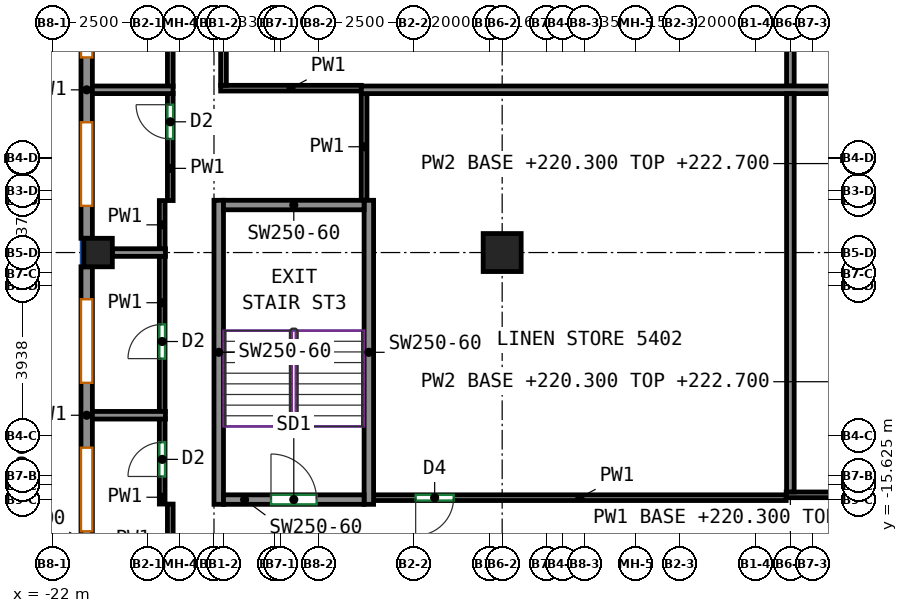
"""IFC4 building model, lengths in metres.
Left out: names, types, materials, properties, quantities, classifications, styles, units other than length and angle.
Written with IfcOpenShell. Run it as: python <this file> out.ifc"""

import sys

from ifc_helpers import new_model, si_unit, direction, frame, frame_2d, origin, origin_2d, place, context, subcontext, project, spatial, rectangle, extrude, source, transform, mapped, element, fill, save


model = new_model("IFC4")
c1 = context("Model", 3, precision=1e-05, world=origin(), true_north=direction((0.0, 1.0)))
c2 = subcontext(c1, "Body", "Model", "MODEL_VIEW")
j1 = project(units=[si_unit("LENGTHUNIT", "METRE"), si_unit("PLANEANGLEUNIT", "RADIAN")], contexts=[c1])
p1 = place(None, origin())
s1 = spatial("IfcSite", under=j1, at=p1, CompositionType="ELEMENT")
p2 = place(p1, origin())
s2 = spatial("IfcBuilding", under=s1, at=p2, CompositionType="ELEMENT")
p3 = place(p2, frame((0.0, 0.0, 220.3)))
s3 = spatial("IfcBuildingStorey", under=s2, at=p3, CompositionType="ELEMENT", Elevation=220.3)
m1 = source(origin(), c2, "Body", "SweptSolid", [
    extrude(rectangle(XDim=0.75, YDim=0.75, at=origin_2d()), origin(), (0.0, 0.0, 1.0), 3.0),
])
p4 = place(p3, frame((-20.8, -9.125, 0.0), z_axis=(0.0, 0.0, 1.0), x_axis=(1.0, 0.0, 0.0)))
e1 = element("IfcColumn", 1, at=p4, inside=s3, PredefinedType="COLUMN", context=c2, shape_type="MappedRepresentation", body=[
    mapped(m1, transform((0.0, 0.0, 0.0))),
])
m2 = source(origin(), c2, "Body", "SweptSolid", [
    extrude(rectangle(XDim=1.0, YDim=1.0, at=origin_2d()), origin(), (0.0, 0.0, 1.0), 3.0),
])
p5 = place(p3, frame((-10.167, -9.125, 0.0), z_axis=(0.0, 0.0, 1.0), x_axis=(1.0, 0.0, 0.0)))
e2 = element("IfcColumn", 2, at=p5, inside=s3, PredefinedType="COLUMN", context=c2, shape_type="MappedRepresentation", body=[
    mapped(m2, transform((0.0, 0.0, 0.0))),
])
m3 = source(origin(), c2, "Body", "SweptSolid", [
    extrude(rectangle(XDim=8.0, YDim=0.25, at=frame_2d((4.0, 0.0))), origin(), (0.0, 0.0, 1.0), 3.0),
])
for number, where, z_axis, x_axis in (
    (3, (-17.625, -15.75, 0.0), (0.0, 0.0, 1.0), (0.0, 1.0, 0.0)),
    (4, (-13.675, -15.75, 0.0), (0.0, 0.0, 1.0), (0.0, 1.0, 0.0)),
):
    element("IfcWall", number, at=place(p3, frame(where, z_axis=z_axis, x_axis=x_axis)), inside=s3, PredefinedType="SHEAR", context=c2, shape_type="MappedRepresentation", body=[
        mapped(m3, transform((0.0, 0.0, 0.0))),
    ])
m4 = source(origin(), c2, "Body", "SweptSolid", [
    extrude(rectangle(XDim=3.7, YDim=0.25, at=frame_2d((1.85, 0.0))), origin(), (0.0, 0.0, 1.0), 3.0),
])
p6 = place(p3, frame((-17.5, -15.625, 0.0), z_axis=(0.0, 0.0, 1.0), x_axis=(1.0, 0.0, 0.0)))
e5 = element("IfcWall", 5, at=p6, inside=s3, PredefinedType="SHEAR", context=c2, shape_type="MappedRepresentation", body=[
    mapped(m4, transform((0.0, 0.0, 0.0))),
])
p7 = place(p6, frame((1.25, 0.0, 0.0)))
e6 = element("IfcOpeningElement", 6, at=p7, cuts=e5, PredefinedType="OPENING", context=c2, shape_type="SweptSolid", body=[
    extrude(rectangle(XDim=1.2, YDim=2.1, at=frame_2d((0.6, 1.05))), frame((0.0, 0.135, 0.0), z_axis=(0.0, -1.0, 0.0), x_axis=(1.0, 0.0, 0.0)), (0.0, 0.0, 1.0), 0.27),
])
p8 = place(p3, frame((-17.5, -7.875, 0.0), z_axis=(0.0, 0.0, 1.0), x_axis=(1.0, 0.0, 0.0)))
e7 = element("IfcWall", 7, at=p8, inside=s3, PredefinedType="SHEAR", context=c2, shape_type="MappedRepresentation", body=[
    mapped(m4, transform((0.0, 0.0, 0.0))),
])
m5 = source(origin(), c2, "Body", "SweptSolid", [
    extrude(rectangle(XDim=7.812, YDim=0.3, at=frame_2d((3.906, 0.0))), origin(), (0.0, 0.0, 1.0), 3.0),
])
p9 = place(p3, frame((-21.1, -0.938, 0.0), z_axis=(0.0, 0.0, 1.0), x_axis=(0.0, -1.0, 0.0)))
e8 = element("IfcWall", 8, at=p9, inside=s3, PredefinedType="SOLIDWALL", context=c2, shape_type="MappedRepresentation", body=[
    mapped(m5, transform((0.0, 0.0, 0.0))),
])
p10 = place(p9, frame((0.853, 0.0, 0.85)))
e9 = element("IfcOpeningElement", 9, at=p10, cuts=e8, PredefinedType="OPENING", context=c2, shape_type="SweptSolid", body=[
    extrude(rectangle(XDim=2.2, YDim=1.95, at=frame_2d((1.1, 0.975))), frame((0.0, 0.16, 0.0), z_axis=(0.0, -1.0, 0.0), x_axis=(1.0, 0.0, 0.0)), (0.0, 0.0, 1.0), 0.32),
])
p11 = place(p9, frame((4.76, 0.0, 0.85)))
e10 = element("IfcOpeningElement", 10, at=p11, cuts=e8, PredefinedType="OPENING", context=c2, shape_type="SweptSolid", body=[
    extrude(rectangle(XDim=2.2, YDim=1.95, at=frame_2d((1.1, 0.975))), frame((0.0, 0.16, 0.0), z_axis=(0.0, -1.0, 0.0), x_axis=(1.0, 0.0, 0.0)), (0.0, 0.0, 1.0), 0.32),
])
p12 = place(p3, frame((-21.1, -9.5, 0.0), z_axis=(0.0, 0.0, 1.0), x_axis=(0.0, -1.0, 0.0)))
e11 = element("IfcWall", 11, at=p12, inside=s3, PredefinedType="SOLIDWALL", context=c2, shape_type="MappedRepresentation", body=[
    mapped(m5, transform((0.0, 0.0, 0.0))),
])
p13 = place(p12, frame((0.853, 0.0, 0.85)))
e12 = element("IfcOpeningElement", 12, at=p13, cuts=e11, PredefinedType="OPENING", context=c2, shape_type="SweptSolid", body=[
    extrude(rectangle(XDim=2.2, YDim=1.95, at=frame_2d((1.1, 0.975))), frame((0.0, 0.16, 0.0), z_axis=(0.0, -1.0, 0.0), x_axis=(1.0, 0.0, 0.0)), (0.0, 0.0, 1.0), 0.32),
])
p14 = place(p12, frame((4.759, 0.0, 0.85)))
e13 = element("IfcOpeningElement", 13, at=p14, cuts=e11, PredefinedType="OPENING", context=c2, shape_type="SweptSolid", body=[
    extrude(rectangle(XDim=2.2, YDim=1.95, at=frame_2d((1.1, 0.975))), frame((0.0, 0.16, 0.0), z_axis=(0.0, -1.0, 0.0), x_axis=(1.0, 0.0, 0.0)), (0.0, 0.0, 1.0), 0.32),
])
p15 = place(p3, frame((-18.9, -17.598, 0.0), z_axis=(0.0, 0.0, 1.0), x_axis=(0.0, 1.0, 0.0)))
e14 = element("IfcWall", 14, at=p15, inside=s3, PredefinedType="PARTITIONING", context=c2, shape_type="SweptSolid", body=[
    extrude(rectangle(XDim=1.855, YDim=0.15, at=frame_2d((0.927, 0.0))), origin(), (0.0, 0.0, 1.0), 3.0),
])
p16 = place(p3, frame((-19.113, -15.743, 0.0), z_axis=(0.0, 0.0, 1.0), x_axis=(0.0, 1.0, 0.0)))
e15 = element("IfcWall", 15, at=p16, inside=s3, PredefinedType="PARTITIONING", context=c2, shape_type="SweptSolid", body=[
    extrude(rectangle(XDim=2.247, YDim=0.15, at=frame_2d((1.124, 0.0))), origin(), (0.0, 0.0, 1.0), 3.0),
])
p17 = place(p16, frame((0.726, 0.0, 0.0)))
e16 = element("IfcOpeningElement", 16, at=p17, cuts=e15, PredefinedType="OPENING", context=c2, shape_type="SweptSolid", body=[
    extrude(rectangle(XDim=0.9, YDim=2.1, at=frame_2d((0.45, 1.05))), frame((0.0, 0.085, 0.0), z_axis=(0.0, -1.0, 0.0), x_axis=(1.0, 0.0, 0.0)), (0.0, 0.0, 1.0), 0.17),
])
p18 = place(p3, frame((-19.113, -13.316, 0.0), z_axis=(0.0, 0.0, 1.0), x_axis=(0.0, 1.0, 0.0)))
e17 = element("IfcWall", 17, at=p18, inside=s3, PredefinedType="PARTITIONING", context=c2, shape_type="SweptSolid", body=[
    extrude(rectangle(XDim=4.101, YDim=0.15, at=frame_2d((2.05, 0.0))), origin(), (0.0, 0.0, 1.0), 3.0),
])
p19 = place(p18, frame((1.4, 0.0, 0.0)))
e18 = element("IfcOpeningElement", 18, at=p19, cuts=e17, PredefinedType="OPENING", context=c2, shape_type="SweptSolid", body=[
    extrude(rectangle(XDim=0.9, YDim=2.1, at=frame_2d((0.45, 1.05))), frame((0.0, 0.085, 0.0), z_axis=(0.0, -1.0, 0.0), x_axis=(1.0, 0.0, 0.0)), (0.0, 0.0, 1.0), 0.17),
])
p20 = place(p3, frame((-18.9, -7.757, 0.0), z_axis=(0.0, 0.0, 1.0), x_axis=(0.0, 1.0, 0.0)))
e19 = element("IfcWall", 19, at=p20, inside=s3, PredefinedType="PARTITIONING", context=c2, shape_type="SweptSolid", body=[
    extrude(rectangle(XDim=2.824, YDim=0.15, at=frame_2d((1.412, 0.0))), origin(), (0.0, 0.0, 1.0), 3.0),
])
p21 = place(p20, frame((1.622, 0.0, 0.0)))
e20 = element("IfcOpeningElement", 20, at=p21, cuts=e19, PredefinedType="OPENING", context=c2, shape_type="SweptSolid", body=[
    extrude(rectangle(XDim=0.9, YDim=2.1, at=frame_2d((0.45, 1.05))), frame((0.0, 0.085, 0.0), z_axis=(0.0, -1.0, 0.0), x_axis=(1.0, 0.0, 0.0)), (0.0, 0.0, 1.0), 0.17),
])
p22 = place(p3, frame((-19.113, -9.035, 0.0), z_axis=(0.0, 0.0, 1.0), x_axis=(0.0, 1.0, 0.0)))
e21 = element("IfcWall", 21, at=p22, inside=s3, PredefinedType="PARTITIONING", context=c2, shape_type="SweptSolid", body=[
    extrude(rectangle(XDim=1.278, YDim=0.15, at=frame_2d((0.639, 0.0))), origin(), (0.0, 0.0, 1.0), 3.0),
])
p23 = place(p3, frame((-18.9, -4.753, 0.0), z_axis=(0.0, 0.0, 1.0), x_axis=(0.0, 1.0, 0.0)))
e22 = element("IfcWall", 22, at=p23, inside=s3, PredefinedType="PARTITIONING", context=c2, shape_type="SweptSolid", body=[
    extrude(rectangle(XDim=4.101, YDim=0.15, at=frame_2d((2.05, 0.0))), origin(), (0.0, 0.0, 1.0), 3.0),
])
p24 = place(p23, frame((2.701, 0.0, 0.0)))
e23 = element("IfcOpeningElement", 23, at=p24, cuts=e22, PredefinedType="OPENING", context=c2, shape_type="SweptSolid", body=[
    extrude(rectangle(XDim=0.9, YDim=2.1, at=frame_2d((0.45, 1.05))), frame((0.0, 0.085, 0.0), z_axis=(0.0, -1.0, 0.0), x_axis=(1.0, 0.0, 0.0)), (0.0, 0.0, 1.0), 0.17),
])
p25 = place(p3, frame((-17.575, -4.8, 0.0), z_axis=(0.0, 0.0, 1.0), x_axis=(1.0, 0.0, 0.0)))
e24 = element("IfcWall", 24, at=p25, inside=s3, PredefinedType="PARTITIONING", context=c2, shape_type="SweptSolid", body=[
    extrude(rectangle(XDim=3.702, YDim=0.15, at=frame_2d((1.851, 0.0))), origin(), (0.0, 0.0, 1.0), 3.0),
])
p26 = place(p3, frame((-17.5, -4.725, 0.0), z_axis=(0.0, 0.0, 1.0), x_axis=(0.0, 1.0, 0.0)))
e25 = element("IfcWall", 25, at=p26, inside=s3, PredefinedType="PARTITIONING", context=c2, shape_type="SweptSolid", body=[
    extrude(rectangle(XDim=8.35, YDim=0.15, at=frame_2d((4.175, 0.0))), origin(), (0.0, 0.0, 1.0), 3.0),
])
p27 = place(p3, frame((-13.8, -7.75, 0.0), z_axis=(0.0, 0.0, 1.0), x_axis=(0.0, 1.0, 0.0)))
e26 = element("IfcWall", 26, at=p27, inside=s3, PredefinedType="PARTITIONING", context=c2, shape_type="SweptSolid", body=[
    extrude(rectangle(XDim=2.817, YDim=0.15, at=frame_2d((1.408, 0.0))), origin(), (0.0, 0.0, 1.0), 3.0),
])
p28 = place(p3, frame((-2.693, -15.575, 0.0), z_axis=(0.0, 0.0, 1.0), x_axis=(-1.0, 0.0, 0.0)))
e27 = element("IfcWall", 27, at=p28, inside=s3, PredefinedType="PARTITIONING", context=c2, shape_type="SweptSolid", body=[
    extrude(rectangle(XDim=10.857, YDim=0.15, at=frame_2d((5.428, 0.0))), origin(), (0.0, 0.0, 1.0), 3.0),
])
p29 = place(p28, frame((8.75, 0.0, 0.0)))
e28 = element("IfcOpeningElement", 28, at=p29, cuts=e27, PredefinedType="OPENING", context=c2, shape_type="SweptSolid", body=[
    extrude(rectangle(XDim=1.0, YDim=2.1, at=frame_2d((0.5, 1.05))), frame((0.0, 0.085, 0.0), z_axis=(0.0, -1.0, 0.0), x_axis=(1.0, 0.0, 0.0)), (0.0, 0.0, 1.0), 0.17),
])
p30 = place(p3, frame((-2.693, -15.5, 0.0), z_axis=(0.0, 0.0, 1.0), x_axis=(1.0, 0.0, 0.0)))
e29 = element("IfcWall", 29, at=p30, inside=s3, PredefinedType="PARTITIONING", context=c2, shape_type="SweptSolid", body=[
    extrude(rectangle(XDim=18.968, YDim=0.15, at=frame_2d((9.484, 0.0))), origin(), (0.0, 0.0, 1.0), 3.0),
])
p31 = place(p30, frame((6.403, 0.0, 0.0)))
e30 = element("IfcOpeningElement", 30, at=p31, cuts=e29, PredefinedType="OPENING", context=c2, shape_type="SweptSolid", body=[
    extrude(rectangle(XDim=0.9, YDim=2.1, at=frame_2d((0.45, 1.05))), frame((0.0, 0.085, 0.0), z_axis=(0.0, -1.0, 0.0), x_axis=(1.0, 0.0, 0.0)), (0.0, 0.0, 1.0), 0.17),
])
p32 = place(p30, frame((11.985, 0.0, 0.0)))
e31 = element("IfcOpeningElement", 31, at=p32, cuts=e29, PredefinedType="OPENING", context=c2, shape_type="SweptSolid", body=[
    extrude(rectangle(XDim=0.9, YDim=2.1, at=frame_2d((0.45, 1.05))), frame((0.0, 0.085, 0.0), z_axis=(0.0, -1.0, 0.0), x_axis=(1.0, 0.0, 0.0)), (0.0, 0.0, 1.0), 0.17),
])
p33 = place(p3, frame((-19.027, -13.406, 0.0), z_axis=(0.0, 0.0, 1.0), x_axis=(-1.0, 0.0, 0.0)))
e32 = element("IfcWall", 32, at=p33, inside=s3, PredefinedType="PARTITIONING", context=c2, shape_type="SweptSolid", body=[
    extrude(rectangle(XDim=1.973, YDim=0.2, at=frame_2d((0.986, 0.0))), origin(), (0.0, 0.0, 1.0), 3.0),
])
p34 = place(p3, frame((-20.425, -9.125, 0.0), z_axis=(0.0, 0.0, 1.0), x_axis=(1.0, 0.0, 0.0)))
e33 = element("IfcWall", 33, at=p34, inside=s3, PredefinedType="PARTITIONING", context=c2, shape_type="SweptSolid", body=[
    extrude(rectangle(XDim=1.398, YDim=0.2, at=frame_2d((0.699, 0.0))), origin(), (0.0, 0.0, 1.0), 3.0),
])
p35 = place(p3, frame((-21.0, -4.843, 0.0), z_axis=(0.0, 0.0, 1.0), x_axis=(1.0, 0.0, 0.0)))
e34 = element("IfcWall", 34, at=p35, inside=s3, PredefinedType="PARTITIONING", context=c2, shape_type="SweptSolid", body=[
    extrude(rectangle(XDim=2.173, YDim=0.2, at=frame_2d((1.086, 0.0))), origin(), (0.0, 0.0, 1.0), 3.0),
])
p36 = place(p3, frame((-2.583, -4.743, 0.0), z_axis=(0.0, 0.0, 1.0), x_axis=(0.0, 1.0, 0.0)))
e35 = element("IfcWall", 35, at=p36, inside=s3, PredefinedType="PARTITIONING", context=c2, shape_type="SweptSolid", body=[
    extrude(rectangle(XDim=8.366, YDim=0.2, at=frame_2d((4.183, 0.0))), origin(), (0.0, 0.0, 1.0), 3.0),
])
p37 = place(p3, frame((-13.873, -4.843, 0.0), z_axis=(0.0, 0.0, 1.0), x_axis=(1.0, 0.0, 0.0)))
e36 = element("IfcWall", 36, at=p37, inside=s3, PredefinedType="PARTITIONING", context=c2, shape_type="SweptSolid", body=[
    extrude(rectangle(XDim=30.146, YDim=0.2, at=frame_2d((15.073, 0.0))), origin(), (0.0, 0.0, 1.0), 3.0),
])
p38 = place(p3, frame((-2.583, -15.423, 0.0), z_axis=(0.0, 0.0, 1.0), x_axis=(0.0, 1.0, 0.0)))
e37 = element("IfcWall", 37, at=p38, inside=s3, PredefinedType="PARTITIONING", context=c2, shape_type="SweptSolid", body=[
    extrude(rectangle(XDim=10.48, YDim=0.2, at=frame_2d((5.24, 0.0))), origin(), (0.0, 0.0, 1.0), 3.0),
])
p39 = place(p10, origin())
e38 = element("IfcWindow", 38, at=p39, inside=s3, PartitioningType="SINGLE_PANEL", PredefinedType="WINDOW", context=c2, shape_type="SweptSolid", body=[
    extrude(rectangle(XDim=2.2, YDim=1.95, at=frame_2d((1.1, 0.975))), frame((0.0, 0.03, 0.0), z_axis=(0.0, -1.0, 0.0), x_axis=(1.0, 0.0, 0.0)), (0.0, 0.0, 1.0), 0.06),
])
fill(e9, e38)
p40 = place(p11, origin())
e39 = element("IfcWindow", 39, at=p40, inside=s3, PartitioningType="SINGLE_PANEL", PredefinedType="WINDOW", context=c2, shape_type="SweptSolid", body=[
    extrude(rectangle(XDim=2.2, YDim=1.95, at=frame_2d((1.1, 0.975))), frame((0.0, 0.03, 0.0), z_axis=(0.0, -1.0, 0.0), x_axis=(1.0, 0.0, 0.0)), (0.0, 0.0, 1.0), 0.06),
])
fill(e10, e39)
p41 = place(p13, origin())
e40 = element("IfcWindow", 40, at=p41, inside=s3, PartitioningType="SINGLE_PANEL", PredefinedType="WINDOW", context=c2, shape_type="SweptSolid", body=[
    extrude(rectangle(XDim=2.2, YDim=1.95, at=frame_2d((1.1, 0.975))), frame((0.0, 0.03, 0.0), z_axis=(0.0, -1.0, 0.0), x_axis=(1.0, 0.0, 0.0)), (0.0, 0.0, 1.0), 0.06),
])
fill(e12, e40)
p42 = place(p14, origin())
e41 = element("IfcWindow", 41, at=p42, inside=s3, PartitioningType="SINGLE_PANEL", PredefinedType="WINDOW", context=c2, shape_type="SweptSolid", body=[
    extrude(rectangle(XDim=2.2, YDim=1.95, at=frame_2d((1.1, 0.975))), frame((0.0, 0.03, 0.0), z_axis=(0.0, -1.0, 0.0), x_axis=(1.0, 0.0, 0.0)), (0.0, 0.0, 1.0), 0.06),
])
fill(e13, e41)
p43 = place(p7, origin())
e42 = element("IfcDoor", 42, at=p43, inside=s3, OperationType="DOUBLE_DOOR_SINGLE_SWING", PredefinedType="DOOR", context=c2, shape_type="SweptSolid", body=[
    extrude(rectangle(XDim=1.2, YDim=2.1, at=frame_2d((0.6, 1.05))), frame((0.0, 0.025, 0.0), z_axis=(0.0, -1.0, 0.0), x_axis=(1.0, 0.0, 0.0)), (0.0, 0.0, 1.0), 0.05),
])
fill(e6, e42)
p44 = place(p29, origin())
e43 = element("IfcDoor", 43, at=p44, inside=s3, OperationType="SINGLE_SWING_RIGHT", PredefinedType="DOOR", context=c2, shape_type="SweptSolid", body=[
    extrude(rectangle(XDim=1.0, YDim=2.1, at=frame_2d((0.5, 1.05))), frame((0.0, 0.025, 0.0), z_axis=(0.0, -1.0, 0.0), x_axis=(1.0, 0.0, 0.0)), (0.0, 0.0, 1.0), 0.05),
])
fill(e28, e43)
p45 = place(p17, origin())
e44 = element("IfcDoor", 44, at=p45, inside=s3, OperationType="SINGLE_SWING_LEFT", PredefinedType="DOOR", context=c2, shape_type="SweptSolid", body=[
    extrude(rectangle(XDim=0.9, YDim=2.1, at=frame_2d((0.45, 1.05))), frame((0.0, 0.025, 0.0), z_axis=(0.0, -1.0, 0.0), x_axis=(1.0, 0.0, 0.0)), (0.0, 0.0, 1.0), 0.05),
])
fill(e16, e44)
p46 = place(p19, origin())
e45 = element("IfcDoor", 45, at=p46, inside=s3, OperationType="SINGLE_SWING_LEFT", PredefinedType="DOOR", context=c2, shape_type="SweptSolid", body=[
    extrude(rectangle(XDim=0.9, YDim=2.1, at=frame_2d((0.45, 1.05))), frame((0.0, 0.025, 0.0), z_axis=(0.0, -1.0, 0.0), x_axis=(1.0, 0.0, 0.0)), (0.0, 0.0, 1.0), 0.05),
])
fill(e18, e45)
p47 = place(p21, origin())
e46 = element("IfcDoor", 46, at=p47, inside=s3, OperationType="SINGLE_SWING_RIGHT", PredefinedType="DOOR", context=c2, shape_type="SweptSolid", body=[
    extrude(rectangle(XDim=0.9, YDim=2.1, at=frame_2d((0.45, 1.05))), frame((0.0, 0.025, 0.0), z_axis=(0.0, -1.0, 0.0), x_axis=(1.0, 0.0, 0.0)), (0.0, 0.0, 1.0), 0.05),
])
fill(e20, e46)
save(model, sys.argv[1])
